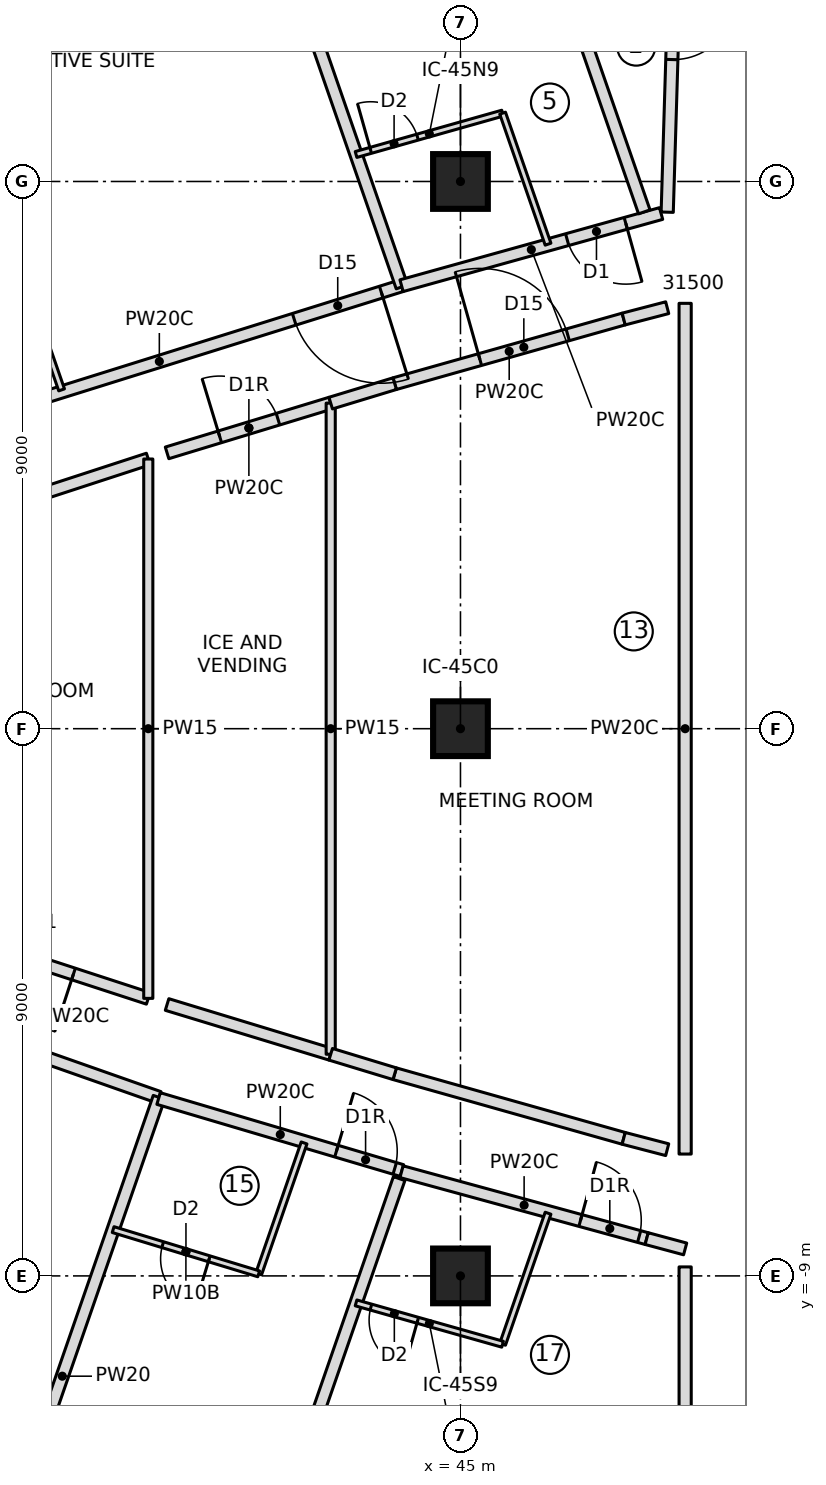
"""IFC4 building model, lengths in metres.
Left out: names, types, materials, properties, quantities, classifications, styles, units other than length and angle.
Written with IfcOpenShell. Run it as: python <this file> out.ifc"""

import sys

from ifc_helpers import new_model, si_unit, direction, frame, frame_2d, origin, origin_2d, place, context, subcontext, project, spatial, rectangle, extrude, element, fill, save


model = new_model("IFC4")
c1 = context("Model", 3, precision=1e-05, world=origin(), true_north=direction((0.0, 1.0)))
c2 = subcontext(c1, "Body", "Model", "MODEL_VIEW")
j1 = project(units=[si_unit("LENGTHUNIT", "METRE"), si_unit("PLANEANGLEUNIT", "RADIAN")], contexts=[c1])
p1 = place(None, origin())
s1 = spatial("IfcSite", under=j1, at=p1, CompositionType="ELEMENT")
p2 = place(p1, origin())
s2 = spatial("IfcBuilding", under=s1, at=p2, CompositionType="ELEMENT")
p3 = place(p2, frame((0.0, 0.0, 296.3)))
s3 = spatial("IfcBuildingStorey", under=s2, at=p3, CompositionType="ELEMENT", Elevation=296.3)
for number, where, z_axis, x_axis in (
    (1, (45.0, -9.0, 0.0), (0.0, 0.0, 1.0), (1.0, 0.0, 0.0)),
    (2, (45.0, 0.0, 0.0), (0.0, 0.0, 1.0), (1.0, 0.0, 0.0)),
    (3, (45.0, 9.0, 0.0), (0.0, 0.0, 1.0), (1.0, 0.0, 0.0)),
):
    element("IfcColumn", number, at=place(p3, frame(where, z_axis=z_axis, x_axis=x_axis)), inside=s3, PredefinedType="COLUMN", context=c2, shape_type="SweptSolid", body=[
        extrude(rectangle(XDim=0.9, YDim=0.9, at=origin_2d()), origin(), (0.0, 0.0, 1.0), 3.55),
    ])
p4 = place(p3, frame((44.031, 7.286, 0.0), z_axis=(0.0, 0.0, 1.0), x_axis=(-0.95441177989, -0.29849313963, 0.0)))
e4 = element("IfcWall", 4, at=p4, inside=s3, PredefinedType="PARTITIONING", context=c2, shape_type="SweptSolid", body=[
    extrude(rectangle(XDim=8.348, YDim=0.2, at=frame_2d((4.174, 0.0))), origin(), (0.0, 0.0, 1.0), 3.25),
])
p5 = place(p4, frame((0.35, 0.0, 0.0)))
e5 = element("IfcOpeningElement", 5, at=p5, cuts=e4, PredefinedType="OPENING", context=c2, shape_type="SweptSolid", body=[
    extrude(rectangle(XDim=1.5, YDim=2.1, at=frame_2d((0.75, 1.05))), frame((0.0, 0.11, 0.0), z_axis=(0.0, -1.0, 0.0), x_axis=(1.0, 0.0, 0.0)), (0.0, 0.0, 1.0), 0.22),
])
p6 = place(p3, frame((37.694, 7.724, 0.0), z_axis=(0.0, 0.0, 1.0), x_axis=(0.327622330203, -0.944808768351, 0.0)))
e6 = element("IfcWall", 6, at=p6, inside=s3, PredefinedType="PARTITIONING", context=c2, shape_type="SweptSolid", body=[
    extrude(rectangle(XDim=2.277, YDim=0.1, at=frame_2d((1.139, 0.0))), origin(), (0.0, 0.0, 1.0), 3.25),
])
p7 = place(p3, frame((44.038, 7.267, 0.0), z_axis=(0.0, 0.0, 1.0), x_axis=(-0.327714576096, 0.944776776077, 0.0)))
e7 = element("IfcWall", 7, at=p7, inside=s3, PredefinedType="PARTITIONING", context=c2, shape_type="SweptSolid", body=[
    extrude(rectangle(XDim=9.717, YDim=0.2, at=frame_2d((4.858, 0.0))), origin(), (0.0, 0.0, 1.0), 3.25),
])
p8 = place(p3, frame((48.299, 8.473, 0.0), z_axis=(0.0, 0.0, 1.0), x_axis=(-0.96343417102, -0.267945140115, 0.0)))
e8 = element("IfcWall", 8, at=p8, inside=s3, PredefinedType="PARTITIONING", context=c2, shape_type="SweptSolid", body=[
    extrude(rectangle(XDim=4.43, YDim=0.2, at=frame_2d((2.215, 0.0))), origin(), (0.0, 0.0, 1.0), 3.25),
])
p9 = place(p8, frame((0.603, 0.0, 0.0)))
e9 = element("IfcOpeningElement", 9, at=p9, cuts=e8, PredefinedType="OPENING", context=c2, shape_type="SweptSolid", body=[
    extrude(rectangle(XDim=1.0, YDim=2.1, at=frame_2d((0.5, 1.05))), frame((0.0, 0.11, 0.0), z_axis=(0.0, -1.0, 0.0), x_axis=(1.0, 0.0, 0.0)), (0.0, 0.0, 1.0), 0.22),
])
p10 = place(p3, frame((43.283, 9.444, 0.0), z_axis=(0.0, 0.0, 1.0), x_axis=(0.962409173596, 0.271603723424, 0.0)))
e10 = element("IfcWall", 10, at=p10, inside=s3, PredefinedType="PARTITIONING", context=c2, shape_type="SweptSolid", body=[
    extrude(rectangle(XDim=2.504, YDim=0.1, at=frame_2d((1.252, 0.0))), origin(), (0.0, 0.0, 1.0), 3.25),
])
p11 = place(p10, frame((0.25, 0.0, 0.0)))
e11 = element("IfcOpeningElement", 11, at=p11, cuts=e10, PredefinedType="OPENING", context=c2, shape_type="SweptSolid", body=[
    extrude(rectangle(XDim=0.8, YDim=2.1, at=frame_2d((0.4, 1.05))), frame((0.0, 0.06, 0.0), z_axis=(0.0, -1.0, 0.0), x_axis=(1.0, 0.0, 0.0)), (0.0, 0.0, 1.0), 0.12),
])
p12 = place(p3, frame((45.693, 10.124, 0.0), z_axis=(0.0, 0.0, 1.0), x_axis=(0.327764902685, -0.944759317799, 0.0)))
e12 = element("IfcWall", 12, at=p12, inside=s3, PredefinedType="PARTITIONING", context=c2, shape_type="SweptSolid", body=[
    extrude(rectangle(XDim=2.281, YDim=0.1, at=frame_2d((1.14, 0.0))), origin(), (0.0, 0.0, 1.0), 3.25),
])
p13 = place(p3, frame((48.023, 8.5, 0.0), z_axis=(0.0, 0.0, 1.0), x_axis=(-0.327705598625, 0.944779890043, 0.0)))
e13 = element("IfcWall", 13, at=p13, inside=s3, PredefinedType="PARTITIONING", context=c2, shape_type="SweptSolid", body=[
    extrude(rectangle(XDim=9.61, YDim=0.2, at=frame_2d((4.805, 0.0))), origin(), (0.0, 0.0, 1.0), 3.25),
])
p14 = place(p3, frame((26.85, -1.423, 0.0), z_axis=(0.0, 0.0, 1.0), x_axis=(0.943328585164, -0.331860182022, 0.0)))
e14 = element("IfcWall", 14, at=p14, inside=s3, PredefinedType="PARTITIONING", context=c2, shape_type="SweptSolid", body=[
    extrude(rectangle(XDim=13.984, YDim=0.2, at=frame_2d((6.992, 0.0))), origin(), (0.0, 0.0, 1.0), 3.25),
])
p15 = place(p14, frame((3.05, 0.0, 0.0)))
e15 = element("IfcOpeningElement", 15, at=p15, cuts=e14, PredefinedType="OPENING", context=c2, shape_type="SweptSolid", body=[
    extrude(rectangle(XDim=1.5, YDim=2.1, at=frame_2d((0.75, 1.05))), frame((0.0, 0.11, 0.0), z_axis=(0.0, -1.0, 0.0), x_axis=(1.0, 0.0, 0.0)), (0.0, 0.0, 1.0), 0.22),
])
p16 = place(p3, frame((36.861, -15.235, 0.0), z_axis=(0.0, 0.0, 1.0), x_axis=(0.327710853631, 0.944778067279, 0.0)))
e16 = element("IfcWall", 16, at=p16, inside=s3, PredefinedType="PARTITIONING", context=c2, shape_type="SweptSolid", body=[
    extrude(rectangle(XDim=9.707, YDim=0.2, at=frame_2d((4.854, 0.0))), origin(), (0.0, 0.0, 1.0), 3.25),
])
p17 = place(p3, frame((40.035, -6.083, 0.0), z_axis=(0.0, 0.0, 1.0), x_axis=(0.958901312153, -0.283739799027, 0.0)))
e17 = element("IfcWall", 17, at=p17, inside=s3, PredefinedType="PARTITIONING", context=c2, shape_type="SweptSolid", body=[
    extrude(rectangle(XDim=4.174, YDim=0.2, at=frame_2d((2.087, 0.0))), origin(), (0.0, 0.0, 1.0), 3.25),
])
p18 = place(p17, frame((3.05, 0.0, 0.0)))
e18 = element("IfcOpeningElement", 18, at=p18, cuts=e17, PredefinedType="OPENING", context=c2, shape_type="SweptSolid", body=[
    extrude(rectangle(XDim=1.0, YDim=2.1, at=frame_2d((0.5, 1.05))), frame((0.0, 0.11, 0.0), z_axis=(0.0, -1.0, 0.0), x_axis=(1.0, 0.0, 0.0)), (0.0, 0.0, 1.0), 0.22),
])
p19 = place(p3, frame((42.428, -6.813, 0.0), z_axis=(0.0, 0.0, 1.0), x_axis=(-0.327743427431, -0.944766767925, 0.0)))
e19 = element("IfcWall", 19, at=p19, inside=s3, PredefinedType="PARTITIONING", context=c2, shape_type="SweptSolid", body=[
    extrude(rectangle(XDim=2.279, YDim=0.1, at=frame_2d((1.139, 0.0))), origin(), (0.0, 0.0, 1.0), 3.25),
])
p20 = place(p3, frame((41.681, -8.966, 0.0), z_axis=(0.0, 0.0, 1.0), x_axis=(-0.956723503196, 0.290998519638, 0.0)))
e20 = element("IfcWall", 20, at=p20, inside=s3, PredefinedType="PARTITIONING", context=c2, shape_type="SweptSolid", body=[
    extrude(rectangle(XDim=2.502, YDim=0.1, at=frame_2d((1.251, 0.0))), origin(), (0.0, 0.0, 1.0), 3.25),
])
p21 = place(p20, frame((0.85, 0.0, 0.0)))
e21 = element("IfcOpeningElement", 21, at=p21, cuts=e20, PredefinedType="OPENING", context=c2, shape_type="SweptSolid", body=[
    extrude(rectangle(XDim=0.8, YDim=2.1, at=frame_2d((0.4, 1.05))), frame((0.0, 0.06, 0.0), z_axis=(0.0, -1.0, 0.0), x_axis=(1.0, 0.0, 0.0)), (0.0, 0.0, 1.0), 0.12),
])
p22 = place(p3, frame((40.854, -16.447, 0.0), z_axis=(0.0, 0.0, 1.0), x_axis=(0.327714654767, 0.944776748788, 0.0)))
e22 = element("IfcWall", 22, at=p22, inside=s3, PredefinedType="PARTITIONING", context=c2, shape_type="SweptSolid", body=[
    extrude(rectangle(XDim=9.577, YDim=0.2, at=frame_2d((4.788, 0.0))), origin(), (0.0, 0.0, 1.0), 3.25),
])
p23 = place(p3, frame((44.031, -7.286, 0.0), z_axis=(0.0, 0.0, 1.0), x_axis=(0.964708521199, -0.263320088726, 0.0)))
e23 = element("IfcWall", 23, at=p23, inside=s3, PredefinedType="PARTITIONING", context=c2, shape_type="SweptSolid", body=[
    extrude(rectangle(XDim=4.179, YDim=0.2, at=frame_2d((2.089, 0.0))), origin(), (0.0, 0.0, 1.0), 3.25),
])
p24 = place(p23, frame((3.05, 0.0, 0.0)))
e24 = element("IfcOpeningElement", 24, at=p24, cuts=e23, PredefinedType="OPENING", context=c2, shape_type="SweptSolid", body=[
    extrude(rectangle(XDim=1.0, YDim=2.1, at=frame_2d((0.5, 1.05))), frame((0.0, 0.11, 0.0), z_axis=(0.0, -1.0, 0.0), x_axis=(1.0, 0.0, 0.0)), (0.0, 0.0, 1.0), 0.22),
])
p25 = place(p3, frame((46.44, -7.969, 0.0), z_axis=(0.0, 0.0, 1.0), x_axis=(-0.327764902685, -0.944759317799, 0.0)))
e25 = element("IfcWall", 25, at=p25, inside=s3, PredefinedType="PARTITIONING", context=c2, shape_type="SweptSolid", body=[
    extrude(rectangle(XDim=2.281, YDim=0.1, at=frame_2d((1.14, 0.0))), origin(), (0.0, 0.0, 1.0), 3.25),
])
p26 = place(p3, frame((45.693, -10.124, 0.0), z_axis=(0.0, 0.0, 1.0), x_axis=(-0.962409173596, 0.271603723424, 0.0)))
e26 = element("IfcWall", 26, at=p26, inside=s3, PredefinedType="PARTITIONING", context=c2, shape_type="SweptSolid", body=[
    extrude(rectangle(XDim=2.504, YDim=0.1, at=frame_2d((1.252, 0.0))), origin(), (0.0, 0.0, 1.0), 3.25),
])
p27 = place(p26, frame((1.45, 0.0, 0.0)))
e27 = element("IfcOpeningElement", 27, at=p27, cuts=e26, PredefinedType="OPENING", context=c2, shape_type="SweptSolid", body=[
    extrude(rectangle(XDim=0.8, YDim=2.1, at=frame_2d((0.4, 1.05))), frame((0.0, 0.06, 0.0), z_axis=(0.0, -1.0, 0.0), x_axis=(1.0, 0.0, 0.0)), (0.0, 0.0, 1.0), 0.12),
])
p28 = place(p3, frame((39.866, -4.435, 0.0), z_axis=(0.0, 0.0, 1.0), x_axis=(-0.950718067733, 0.310056697535, 0.0)))
e28 = element("IfcWall", 28, at=p28, inside=s3, PredefinedType="PARTITIONING", context=c2, shape_type="SweptSolid", body=[
    extrude(rectangle(XDim=3.588, YDim=0.2, at=frame_2d((1.794, 0.0))), origin(), (0.0, 0.0, 1.0), 3.25),
])
p29 = place(p28, frame((1.294, 0.0, 0.0)))
e29 = element("IfcOpeningElement", 29, at=p29, cuts=e28, PredefinedType="OPENING", context=c2, shape_type="SweptSolid", body=[
    extrude(rectangle(XDim=1.0, YDim=2.1, at=frame_2d((0.5, 1.05))), frame((0.0, 0.11, 0.0), z_axis=(0.0, -1.0, 0.0), x_axis=(1.0, 0.0, 0.0)), (0.0, 0.0, 1.0), 0.22),
])
p30 = place(p3, frame((36.455, 3.323, 0.0), z_axis=(0.0, 0.0, 1.0), x_axis=(0.950718067733, 0.310056697535, 0.0)))
e30 = element("IfcWall", 30, at=p30, inside=s3, PredefinedType="PARTITIONING", context=c2, shape_type="SweptSolid", body=[
    extrude(rectangle(XDim=3.588, YDim=0.2, at=frame_2d((1.794, 0.0))), origin(), (0.0, 0.0, 1.0), 3.25),
])
p31 = place(p3, frame((39.866, -4.435, 0.0), z_axis=(0.0, 0.0, 1.0), x_axis=(0.0, 1.0, 0.0)))
e31 = element("IfcWall", 31, at=p31, inside=s3, PredefinedType="PARTITIONING", context=c2, shape_type="SweptSolid", body=[
    extrude(rectangle(XDim=8.871, YDim=0.15, at=frame_2d((4.435, 0.0))), origin(), (0.0, 0.0, 1.0), 3.25),
])
p32 = place(p3, frame((40.175, 4.536, 0.0), z_axis=(0.0, 0.0, 1.0), x_axis=(0.956742178936, 0.290937111838, 0.0)))
e32 = element("IfcWall", 32, at=p32, inside=s3, PredefinedType="PARTITIONING", context=c2, shape_type="SweptSolid", body=[
    extrude(rectangle(XDim=2.813, YDim=0.2, at=frame_2d((1.406, 0.0))), origin(), (0.0, 0.0, 1.0), 3.25),
])
p33 = place(p32, frame((0.906, 0.0, 0.0)))
e33 = element("IfcOpeningElement", 33, at=p33, cuts=e32, PredefinedType="OPENING", context=c2, shape_type="SweptSolid", body=[
    extrude(rectangle(XDim=1.0, YDim=2.1, at=frame_2d((0.5, 1.05))), frame((0.0, 0.11, 0.0), z_axis=(0.0, -1.0, 0.0), x_axis=(1.0, 0.0, 0.0)), (0.0, 0.0, 1.0), 0.22),
])
p34 = place(p3, frame((42.866, -5.354, 0.0), z_axis=(0.0, 0.0, 1.0), x_axis=(-0.956742178936, 0.290937111838, 0.0)))
e34 = element("IfcWall", 34, at=p34, inside=s3, PredefinedType="PARTITIONING", context=c2, shape_type="SweptSolid", body=[
    extrude(rectangle(XDim=2.813, YDim=0.2, at=frame_2d((1.406, 0.0))), origin(), (0.0, 0.0, 1.0), 3.25),
])
p35 = place(p3, frame((42.866, -5.354, 0.0), z_axis=(0.0, 0.0, 1.0), x_axis=(0.0, 1.0, 0.0)))
e35 = element("IfcWall", 35, at=p35, inside=s3, PredefinedType="PARTITIONING", context=c2, shape_type="SweptSolid", body=[
    extrude(rectangle(XDim=10.709, YDim=0.15, at=frame_2d((5.354, 0.0))), origin(), (0.0, 0.0, 1.0), 3.25),
])
p36 = place(p3, frame((43.918, 5.675, 0.0), z_axis=(0.0, 0.0, 1.0), x_axis=(0.962411212211, 0.271596499628, 0.0)))
e36 = element("IfcWall", 36, at=p36, inside=s3, PredefinedType="PARTITIONING", context=c2, shape_type="SweptSolid", body=[
    extrude(rectangle(XDim=3.913, YDim=0.2, at=frame_2d((1.957, 0.0))), origin(), (0.0, 0.0, 1.0), 3.25),
])
p37 = place(p36, frame((1.457, 0.0, 0.0)))
e37 = element("IfcOpeningElement", 37, at=p37, cuts=e36, PredefinedType="OPENING", context=c2, shape_type="SweptSolid", body=[
    extrude(rectangle(XDim=1.5, YDim=2.1, at=frame_2d((0.75, 1.05))), frame((0.0, 0.11, 0.0), z_axis=(0.0, -1.0, 0.0), x_axis=(1.0, 0.0, 0.0)), (0.0, 0.0, 1.0), 0.22),
])
p38 = place(p3, frame((47.684, -6.738, 0.0), z_axis=(0.0, 0.0, 1.0), x_axis=(-0.962411212211, 0.271596499628, 0.0)))
e38 = element("IfcWall", 38, at=p38, inside=s3, PredefinedType="PARTITIONING", context=c2, shape_type="SweptSolid", body=[
    extrude(rectangle(XDim=3.913, YDim=0.2, at=frame_2d((1.957, 0.0))), origin(), (0.0, 0.0, 1.0), 3.25),
])
for number, where, z_axis, x_axis in (
    (39, (43.918, -5.675, 0.0), (0.0, 0.0, 1.0), (-0.957, 0.291, 0.0)),
    (40, (42.866, 5.354, 0.0), (0.0, 0.0, 1.0), (0.957, 0.291, 0.0)),
):
    element("IfcWall", number, at=place(p3, frame(where, z_axis=z_axis, x_axis=x_axis)), inside=s3, PredefinedType="PARTITIONING", context=c2, shape_type="SweptSolid", body=[
        extrude(rectangle(XDim=1.1, YDim=0.2, at=frame_2d((0.55, 0.0))), origin(), (0.0, 0.0, 1.0), 3.25),
    ])
for number, where, z_axis, x_axis in (
    (41, (47.684, 6.738, 0.0), (0.0, 0.0, 1.0), (0.968, 0.253, 0.0)),
    (42, (48.4, -6.924, 0.0), (0.0, 0.0, 1.0), (-0.968, 0.253, 0.0)),
):
    element("IfcWall", number, at=place(p3, frame(where, z_axis=z_axis, x_axis=x_axis)), inside=s3, PredefinedType="PARTITIONING", context=c2, shape_type="SweptSolid", body=[
        extrude(rectangle(XDim=0.74, YDim=0.2, at=frame_2d((0.37, 0.0))), origin(), (0.0, 0.0, 1.0), 3.25),
    ])
p39 = place(p3, frame((48.695, -8.852, 0.0), z_axis=(0.0, 0.0, 1.0), x_axis=(0.0, -1.0, 0.0)))
e43 = element("IfcWall", 43, at=p39, inside=s3, PredefinedType="PARTITIONING", context=c2, shape_type="SweptSolid", body=[
    extrude(rectangle(XDim=6.603, YDim=0.2, at=frame_2d((3.302, 0.0))), origin(), (0.0, 0.0, 1.0), 3.25),
])
p40 = place(p39, frame((2.816, 0.0, 0.0)))
e44 = element("IfcOpeningElement", 44, at=p40, cuts=e43, PredefinedType="OPENING", context=c2, shape_type="SweptSolid", body=[
    extrude(rectangle(XDim=1.0, YDim=2.1, at=frame_2d((0.5, 1.05))), frame((0.0, 0.11, 0.0), z_axis=(0.0, -1.0, 0.0), x_axis=(1.0, 0.0, 0.0)), (0.0, 0.0, 1.0), 0.22),
])
p41 = place(p3, frame((48.583, 14.516, 0.0), z_axis=(0.0, 0.0, 1.0), x_axis=(-0.030318578026, -0.999540286245, 0.0)))
e45 = element("IfcWall", 45, at=p41, inside=s3, PredefinedType="PARTITIONING", context=c2, shape_type="SweptSolid", body=[
    extrude(rectangle(XDim=6.023, YDim=0.2, at=frame_2d((3.012, 0.0))), origin(), (0.0, 0.0, 1.0), 3.25),
])
p42 = place(p41, frame((2.512, 0.0, 0.0)))
e46 = element("IfcOpeningElement", 46, at=p42, cuts=e45, PredefinedType="OPENING", context=c2, shape_type="SweptSolid", body=[
    extrude(rectangle(XDim=1.0, YDim=2.1, at=frame_2d((0.5, 1.05))), frame((0.0, 0.11, 0.0), z_axis=(0.0, -1.0, 0.0), x_axis=(1.0, 0.0, 0.0)), (0.0, 0.0, 1.0), 0.22),
])
p43 = place(p3, frame((48.695, 6.996, 0.0), z_axis=(0.0, 0.0, 1.0), x_axis=(0.0, -1.0, 0.0)))
e47 = element("IfcWall", 47, at=p43, inside=s3, PredefinedType="PARTITIONING", context=c2, shape_type="SweptSolid", body=[
    extrude(rectangle(XDim=13.992, YDim=0.2, at=frame_2d((6.996, 0.0))), origin(), (0.0, 0.0, 1.0), 3.25),
])
p44 = place(p3, frame((48.062, -8.386, 0.0), z_axis=(0.0, 0.0, 1.0), x_axis=(0.965669715173, -0.259772980114, 0.0)))
e48 = element("IfcWall", 48, at=p44, inside=s3, PredefinedType="PARTITIONING", context=c2, shape_type="SweptSolid", body=[
    extrude(rectangle(XDim=0.655, YDim=0.2, at=frame_2d((0.328, 0.0))), origin(), (0.0, 0.0, 1.0), 3.25),
])
p45 = place(p5, origin())
e49 = element("IfcDoor", 49, at=p45, inside=s3, OperationType="DOUBLE_DOOR_SINGLE_SWING", PredefinedType="DOOR", context=c2, shape_type="SweptSolid", body=[
    extrude(rectangle(XDim=1.5, YDim=2.1, at=frame_2d((0.75, 1.05))), frame((0.0, 0.025, 0.0), z_axis=(0.0, -1.0, 0.0), x_axis=(1.0, 0.0, 0.0)), (0.0, 0.0, 1.0), 0.05),
])
fill(e5, e49)
p46 = place(p11, origin())
e50 = element("IfcDoor", 50, at=p46, inside=s3, OperationType="SINGLE_SWING_LEFT", PredefinedType="DOOR", context=c2, shape_type="SweptSolid", body=[
    extrude(rectangle(XDim=0.8, YDim=2.1, at=frame_2d((0.4, 1.05))), frame((0.0, 0.025, 0.0), z_axis=(0.0, -1.0, 0.0), x_axis=(1.0, 0.0, 0.0)), (0.0, 0.0, 1.0), 0.05),
])
fill(e11, e50)
p47 = place(p9, origin())
e51 = element("IfcDoor", 51, at=p47, inside=s3, OperationType="SINGLE_SWING_LEFT", PredefinedType="DOOR", context=c2, shape_type="SweptSolid", body=[
    extrude(rectangle(XDim=1.0, YDim=2.1, at=frame_2d((0.5, 1.05))), frame((0.0, 0.025, 0.0), z_axis=(0.0, -1.0, 0.0), x_axis=(1.0, 0.0, 0.0)), (0.0, 0.0, 1.0), 0.05),
])
fill(e9, e51)
p48 = place(p21, origin())
e52 = element("IfcDoor", 52, at=p48, inside=s3, OperationType="SINGLE_SWING_LEFT", PredefinedType="DOOR", context=c2, shape_type="SweptSolid", body=[
    extrude(rectangle(XDim=0.8, YDim=2.1, at=frame_2d((0.4, 1.05))), frame((0.0, 0.025, 0.0), z_axis=(0.0, -1.0, 0.0), x_axis=(1.0, 0.0, 0.0)), (0.0, 0.0, 1.0), 0.05),
])
fill(e21, e52)
p49 = place(p18, origin())
e53 = element("IfcDoor", 53, at=p49, inside=s3, OperationType="SINGLE_SWING_RIGHT", PredefinedType="DOOR", context=c2, shape_type="SweptSolid", body=[
    extrude(rectangle(XDim=1.0, YDim=2.1, at=frame_2d((0.5, 1.05))), frame((0.0, 0.025, 0.0), z_axis=(0.0, -1.0, 0.0), x_axis=(1.0, 0.0, 0.0)), (0.0, 0.0, 1.0), 0.05),
])
fill(e18, e53)
p50 = place(p27, origin())
e54 = element("IfcDoor", 54, at=p50, inside=s3, OperationType="SINGLE_SWING_LEFT", PredefinedType="DOOR", context=c2, shape_type="SweptSolid", body=[
    extrude(rectangle(XDim=0.8, YDim=2.1, at=frame_2d((0.4, 1.05))), frame((0.0, 0.025, 0.0), z_axis=(0.0, -1.0, 0.0), x_axis=(1.0, 0.0, 0.0)), (0.0, 0.0, 1.0), 0.05),
])
fill(e27, e54)
p51 = place(p24, origin())
e55 = element("IfcDoor", 55, at=p51, inside=s3, OperationType="SINGLE_SWING_RIGHT", PredefinedType="DOOR", context=c2, shape_type="SweptSolid", body=[
    extrude(rectangle(XDim=1.0, YDim=2.1, at=frame_2d((0.5, 1.05))), frame((0.0, 0.025, 0.0), z_axis=(0.0, -1.0, 0.0), x_axis=(1.0, 0.0, 0.0)), (0.0, 0.0, 1.0), 0.05),
])
fill(e24, e55)
p52 = place(p29, origin())
e56 = element("IfcDoor", 56, at=p52, inside=s3, OperationType="SINGLE_SWING_LEFT", PredefinedType="DOOR", context=c2, shape_type="SweptSolid", body=[
    extrude(rectangle(XDim=1.0, YDim=2.1, at=frame_2d((0.5, 1.05))), frame((0.0, 0.025, 0.0), z_axis=(0.0, -1.0, 0.0), x_axis=(1.0, 0.0, 0.0)), (0.0, 0.0, 1.0), 0.05),
])
fill(e29, e56)
p53 = place(p33, origin())
e57 = element("IfcDoor", 57, at=p53, inside=s3, OperationType="SINGLE_SWING_RIGHT", PredefinedType="DOOR", context=c2, shape_type="SweptSolid", body=[
    extrude(rectangle(XDim=1.0, YDim=2.1, at=frame_2d((0.5, 1.05))), frame((0.0, 0.025, 0.0), z_axis=(0.0, -1.0, 0.0), x_axis=(1.0, 0.0, 0.0)), (0.0, 0.0, 1.0), 0.05),
])
fill(e33, e57)
p54 = place(p37, origin())
e58 = element("IfcDoor", 58, at=p54, inside=s3, OperationType="DOUBLE_DOOR_SINGLE_SWING", PredefinedType="DOOR", context=c2, shape_type="SweptSolid", body=[
    extrude(rectangle(XDim=1.5, YDim=2.1, at=frame_2d((0.75, 1.05))), frame((0.0, 0.025, 0.0), z_axis=(0.0, -1.0, 0.0), x_axis=(1.0, 0.0, 0.0)), (0.0, 0.0, 1.0), 0.05),
])
fill(e37, e58)
p55 = place(p42, origin())
e59 = element("IfcDoor", 59, at=p55, inside=s3, OperationType="SINGLE_SWING_LEFT", PredefinedType="DOOR", context=c2, shape_type="SweptSolid", body=[
    extrude(rectangle(XDim=1.0, YDim=2.1, at=frame_2d((0.5, 1.05))), frame((0.0, 0.025, 0.0), z_axis=(0.0, -1.0, 0.0), x_axis=(1.0, 0.0, 0.0)), (0.0, 0.0, 1.0), 0.05),
])
fill(e46, e59)
save(model, sys.argv[1])
